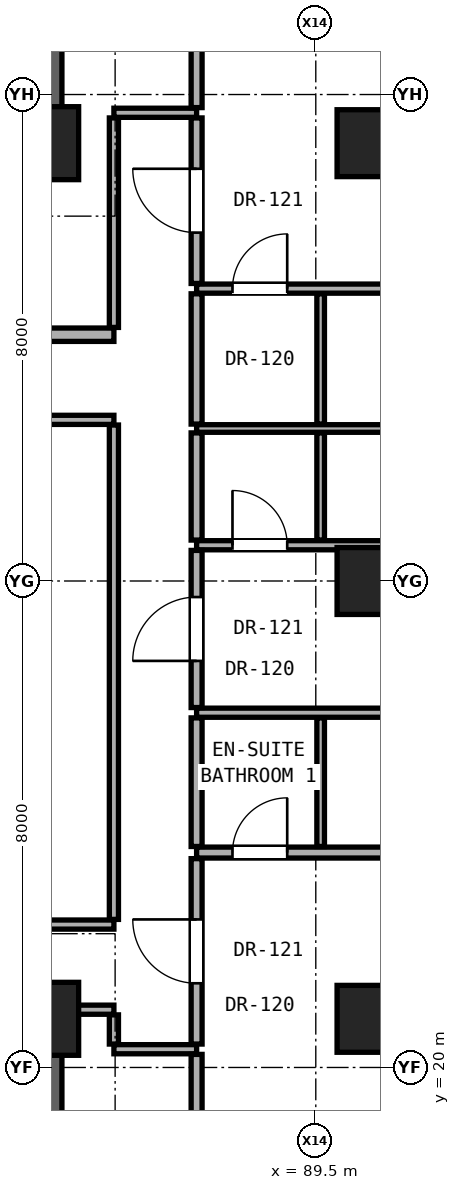
"""IFC4 building model, lengths in metres.
Left out: names, types, materials, properties, quantities, classifications, styles, units other than length and angle.
Written with IfcOpenShell. Run it as: python <this file> out.ifc"""

import sys

from ifc_helpers import new_model, si_unit, direction, frame, frame_2d, origin, origin_2d, place, context, subcontext, project, spatial, rectangle, hollow_rectangle, extrude, element, fill, save


model = new_model("IFC4")
c1 = context("Model", 3, precision=1e-05, world=origin(), true_north=direction((0.0, 1.0)))
c2 = subcontext(c1, "Body", "Model", "MODEL_VIEW")
j1 = project(units=[si_unit("LENGTHUNIT", "METRE"), si_unit("PLANEANGLEUNIT", "RADIAN")], contexts=[c1])
p1 = place(None, origin())
s1 = spatial("IfcSite", under=j1, at=p1, CompositionType="ELEMENT")
p2 = place(p1, origin())
s2 = spatial("IfcBuilding", under=s1, at=p2, CompositionType="ELEMENT")
p3 = place(p2, frame((0.0, 0.0, 111.5)))
s3 = spatial("IfcBuildingStorey", under=s2, at=p3, CompositionType="ELEMENT", Elevation=111.5)
for number, where, z_axis, x_axis in (
    (1, (85.0, 20.8, 0.0), (0.0, 0.0, 1.0), (1.0, 0.0, 0.0)),
    (2, (85.0, 35.2, 0.0), (0.0, 0.0, 1.0), (1.0, 0.0, 0.0)),
):
    element("IfcColumn", number, at=place(p3, frame(where, z_axis=z_axis, x_axis=x_axis)), inside=s3, PredefinedType="COLUMN", context=c2, shape_type="SweptSolid", body=[
        extrude(rectangle(XDim=1.2, YDim=1.2, at=origin_2d()), origin(), (0.0, 0.0, 1.0), 3.3),
    ])
for number, where, z_axis, x_axis in (
    (3, (90.4, 20.8, 0.0), (0.0, 0.0, 1.0), (1.0, 0.0, 0.0)),
    (4, (90.4, 28.0, 0.0), (0.0, 0.0, 1.0), (1.0, 0.0, 0.0)),
    (5, (90.4, 35.2, 0.0), (0.0, 0.0, 1.0), (1.0, 0.0, 0.0)),
):
    element("IfcColumn", number, at=place(p3, frame(where, z_axis=z_axis, x_axis=x_axis)), inside=s3, PredefinedType="COLUMN", context=c2, shape_type="SweptSolid", body=[
        extrude(hollow_rectangle(XDim=1.1, YDim=1.1, WallThickness=0.06, at=origin_2d()), origin(), (0.0, 0.0, 1.0), 3.3),
    ])
for number, where, z_axis, x_axis in (
    (6, (85.0, 35.2, 0.0), (0.0, 0.0, 1.0), (0.0, 1.0, 0.0)),
    (7, (85.0, 15.2, 0.0), (0.0, 0.0, 1.0), (0.0, 1.0, 0.0)),
):
    element("IfcWall", number, at=place(p3, frame(where, z_axis=z_axis, x_axis=x_axis)), inside=s3, PredefinedType="SHEAR", context=c2, shape_type="SweptSolid", body=[
        extrude(rectangle(XDim=5.6, YDim=0.65, at=frame_2d((2.8, 0.0))), origin(), (0.0, 0.0, 1.0), 3.08),
    ])
p4 = place(p3, frame((86.18, 20.3, 0.0), z_axis=(0.0, 0.0, 1.0), x_axis=(1.0, 0.0, 0.0)))
e8 = element("IfcWall", 8, at=p4, inside=s3, PredefinedType="PARTITIONING", context=c2, shape_type="SweptSolid", body=[
    extrude(rectangle(XDim=1.36, YDim=0.15, at=frame_2d((0.68, 0.0))), origin(), (0.0, 0.0, 1.0), 3.08),
])
p5 = place(p3, frame((85.32, 20.95, 0.0), z_axis=(0.0, 0.0, 1.0), x_axis=(1.0, 0.0, 0.0)))
e9 = element("IfcWall", 9, at=p5, inside=s3, PredefinedType="PARTITIONING", context=c2, shape_type="SweptSolid", body=[
    extrude(rectangle(XDim=0.86, YDim=0.15, at=frame_2d((0.43, 0.0))), origin(), (0.0, 0.0, 1.0), 2.472),
])
p6 = place(p3, frame((66.68, 22.35, 0.0), z_axis=(0.0, 0.0, 1.0), x_axis=(1.0, 0.0, 0.0)))
e10 = element("IfcWall", 10, at=p6, inside=s3, PredefinedType="PARTITIONING", context=c2, shape_type="SweptSolid", body=[
    extrude(rectangle(XDim=19.5, YDim=0.15, at=frame_2d((9.75, 0.0))), origin(), (0.0, 0.0, 1.0), 2.145),
])
p7 = place(p6, frame((8.053, 0.0, 0.0)))
e11 = element("IfcOpeningElement", 11, at=p7, cuts=e10, PredefinedType="OPENING", context=c2, shape_type="SweptSolid", body=[
    extrude(rectangle(XDim=0.85, YDim=2.01, at=frame_2d((0.425, 1.005))), frame((0.0, 0.085, 0.0), z_axis=(0.0, -1.0, 0.0), x_axis=(1.0, 0.0, 0.0)), (0.0, 0.0, 1.0), 0.17),
])
p8 = place(p3, frame((87.54, 23.534, 0.0), z_axis=(0.0, 0.0, 1.0), x_axis=(1.0, 0.0, 0.0)))
e12 = element("IfcWall", 12, at=p8, inside=s3, PredefinedType="PARTITIONING", context=c2, shape_type="SweptSolid", body=[
    extrude(rectangle(XDim=7.768, YDim=0.18, at=frame_2d((3.884, 0.0))), origin(), (0.0, 0.0, 1.0), 2.216),
])
p9 = place(p8, frame((4.409, 0.0, 0.0)))
e13 = element("IfcOpeningElement", 13, at=p9, cuts=e12, PredefinedType="OPENING", context=c2, shape_type="SweptSolid", body=[
    extrude(rectangle(XDim=0.95, YDim=2.15, at=frame_2d((0.475, 1.075))), frame((0.0, 0.1, 0.0), z_axis=(0.0, -1.0, 0.0), x_axis=(1.0, 0.0, 0.0)), (0.0, 0.0, 1.0), 0.2),
])
p10 = place(p8, frame((0.59, 0.0, 0.0)))
e14 = element("IfcOpeningElement", 14, at=p10, cuts=e12, PredefinedType="OPENING", context=c2, shape_type="SweptSolid", body=[
    extrude(rectangle(XDim=0.9, YDim=2.1, at=frame_2d((0.45, 1.05))), frame((0.0, 0.1, 0.0), z_axis=(0.0, -1.0, 0.0), x_axis=(1.0, 0.0, 0.0)), (0.0, 0.0, 1.0), 0.2),
])
p11 = place(p3, frame((87.54, 25.834, 0.0), z_axis=(0.0, 0.0, 1.0), x_axis=(1.0, 0.0, 0.0)))
e15 = element("IfcWall", 15, at=p11, inside=s3, PredefinedType="PARTITIONING", context=c2, shape_type="SweptSolid", body=[
    extrude(rectangle(XDim=7.768, YDim=0.15, at=frame_2d((3.884, 0.0))), origin(), (0.0, 0.0, 1.0), 2.216),
])
p12 = place(p3, frame((87.54, 28.588, 0.0), z_axis=(0.0, 0.0, 1.0), x_axis=(1.0, 0.0, 0.0)))
e16 = element("IfcWall", 16, at=p12, inside=s3, PredefinedType="PARTITIONING", context=c2, shape_type="SweptSolid", body=[
    extrude(rectangle(XDim=7.768, YDim=0.15, at=frame_2d((3.884, 0.0))), origin(), (0.0, 0.0, 1.0), 2.216),
])
p13 = place(p12, frame((4.409, 0.0, 0.0)))
e17 = element("IfcOpeningElement", 17, at=p13, cuts=e16, PredefinedType="OPENING", context=c2, shape_type="SweptSolid", body=[
    extrude(rectangle(XDim=0.95, YDim=2.15, at=frame_2d((0.475, 1.075))), frame((0.0, 0.085, 0.0), z_axis=(0.0, -1.0, 0.0), x_axis=(1.0, 0.0, 0.0)), (0.0, 0.0, 1.0), 0.17),
])
p14 = place(p12, frame((0.59, 0.0, 0.0)))
e18 = element("IfcOpeningElement", 18, at=p14, cuts=e16, PredefinedType="OPENING", context=c2, shape_type="SweptSolid", body=[
    extrude(rectangle(XDim=0.9, YDim=2.1, at=frame_2d((0.45, 1.05))), frame((0.0, 0.085, 0.0), z_axis=(0.0, -1.0, 0.0), x_axis=(1.0, 0.0, 0.0)), (0.0, 0.0, 1.0), 0.17),
])
p15 = place(p3, frame((66.68, 30.65, 0.0), z_axis=(0.0, 0.0, 1.0), x_axis=(1.0, 0.0, 0.0)))
e19 = element("IfcWall", 19, at=p15, inside=s3, PredefinedType="PARTITIONING", context=c2, shape_type="SweptSolid", body=[
    extrude(rectangle(XDim=19.5, YDim=0.15, at=frame_2d((9.75, 0.0))), origin(), (0.0, 0.0, 1.0), 2.145),
])
p16 = place(p15, frame((3.795, 0.0, 0.0)))
e20 = element("IfcOpeningElement", 20, at=p16, cuts=e19, PredefinedType="OPENING", context=c2, shape_type="SweptSolid", body=[
    extrude(rectangle(XDim=0.85, YDim=2.01, at=frame_2d((0.425, 1.005))), frame((0.0, 0.085, 0.0), z_axis=(0.0, -1.0, 0.0), x_axis=(1.0, 0.0, 0.0)), (0.0, 0.0, 1.0), 0.17),
])
p17 = place(p15, frame((15.098, 0.0, 0.0)))
e21 = element("IfcOpeningElement", 21, at=p17, cuts=e19, PredefinedType="OPENING", context=c2, shape_type="SweptSolid", body=[
    extrude(rectangle(XDim=0.85, YDim=2.01, at=frame_2d((0.425, 1.005))), frame((0.0, 0.085, 0.0), z_axis=(0.0, -1.0, 0.0), x_axis=(1.0, 0.0, 0.0)), (0.0, 0.0, 1.0), 0.17),
])
p18 = place(p3, frame((87.54, 30.508, 0.0), z_axis=(0.0, 0.0, 1.0), x_axis=(1.0, 0.0, 0.0)))
e22 = element("IfcWall", 22, at=p18, inside=s3, PredefinedType="PARTITIONING", context=c2, shape_type="SweptSolid", body=[
    extrude(rectangle(XDim=7.768, YDim=0.125, at=frame_2d((3.884, 0.0))), origin(), (0.0, 0.0, 1.0), 2.216),
])
p19 = place(p3, frame((71.55, 32.05, 0.0), z_axis=(0.0, 0.0, 1.0), x_axis=(1.0, 0.0, 0.0)))
e23 = element("IfcWall", 23, at=p19, inside=s3, PredefinedType="SOLIDWALL", context=c2, shape_type="SweptSolid", body=[
    extrude(rectangle(XDim=14.63, YDim=0.22, at=frame_2d((7.315, 0.0))), origin(), (0.0, 0.0, 1.0), 2.145),
])
p20 = place(p19, frame((6.065, 0.0, 0.0)))
e24 = element("IfcOpeningElement", 24, at=p20, cuts=e23, PredefinedType="OPENING", context=c2, shape_type="SweptSolid", body=[
    extrude(rectangle(XDim=0.85, YDim=2.01, at=frame_2d((0.425, 1.005))), frame((0.0, 0.12, 0.0), z_axis=(0.0, -1.0, 0.0), x_axis=(1.0, 0.0, 0.0)), (0.0, 0.0, 1.0), 0.24),
])
p21 = place(p19, frame((10.585, 0.0, 0.0)))
e25 = element("IfcOpeningElement", 25, at=p21, cuts=e23, PredefinedType="OPENING", context=c2, shape_type="SweptSolid", body=[
    extrude(rectangle(XDim=0.85, YDim=2.01, at=frame_2d((0.425, 1.005))), frame((0.0, 0.12, 0.0), z_axis=(0.0, -1.0, 0.0), x_axis=(1.0, 0.0, 0.0)), (0.0, 0.0, 1.0), 0.24),
])
p22 = place(p19, frame((0.7, 0.0, 0.0)))
e26 = element("IfcOpeningElement", 26, at=p22, cuts=e23, PredefinedType="OPENING", context=c2, shape_type="SweptSolid", body=[
    extrude(rectangle(XDim=0.85, YDim=2.01, at=frame_2d((0.425, 1.005))), frame((0.0, 0.12, 0.0), z_axis=(0.0, -1.0, 0.0), x_axis=(1.0, 0.0, 0.0)), (0.0, 0.0, 1.0), 0.24),
])
p23 = place(p19, frame((2.55, 0.0, 0.0)))
e27 = element("IfcOpeningElement", 27, at=p23, cuts=e23, PredefinedType="OPENING", context=c2, shape_type="SweptSolid", body=[
    extrude(rectangle(XDim=0.85, YDim=2.01, at=frame_2d((0.425, 1.005))), frame((0.0, 0.12, 0.0), z_axis=(0.0, -1.0, 0.0), x_axis=(1.0, 0.0, 0.0)), (0.0, 0.0, 1.0), 0.24),
])
p24 = place(p3, frame((87.54, 32.808, 0.0), z_axis=(0.0, 0.0, 1.0), x_axis=(1.0, 0.0, 0.0)))
e28 = element("IfcWall", 28, at=p24, inside=s3, PredefinedType="PARTITIONING", context=c2, shape_type="SweptSolid", body=[
    extrude(rectangle(XDim=7.768, YDim=0.15, at=frame_2d((3.884, 0.0))), origin(), (0.0, 0.0, 1.0), 2.216),
])
p25 = place(p24, frame((4.409, 0.0, 0.0)))
e29 = element("IfcOpeningElement", 29, at=p25, cuts=e28, PredefinedType="OPENING", context=c2, shape_type="SweptSolid", body=[
    extrude(rectangle(XDim=0.95, YDim=2.15, at=frame_2d((0.475, 1.075))), frame((0.0, 0.085, 0.0), z_axis=(0.0, -1.0, 0.0), x_axis=(1.0, 0.0, 0.0)), (0.0, 0.0, 1.0), 0.17),
])
p26 = place(p24, frame((0.59, 0.0, 0.0)))
e30 = element("IfcOpeningElement", 30, at=p26, cuts=e28, PredefinedType="OPENING", context=c2, shape_type="SweptSolid", body=[
    extrude(rectangle(XDim=0.9, YDim=2.1, at=frame_2d((0.45, 1.05))), frame((0.0, 0.085, 0.0), z_axis=(0.0, -1.0, 0.0), x_axis=(1.0, 0.0, 0.0)), (0.0, 0.0, 1.0), 0.17),
])
p27 = place(p3, frame((86.18, 35.7, 0.0), z_axis=(0.0, 0.0, 1.0), x_axis=(1.0, 0.0, 0.0)))
e31 = element("IfcWall", 31, at=p27, inside=s3, PredefinedType="PARTITIONING", context=c2, shape_type="SweptSolid", body=[
    extrude(rectangle(XDim=1.36, YDim=0.15, at=frame_2d((0.68, 0.0))), origin(), (0.0, 0.0, 1.0), 3.08),
])
p28 = place(p3, frame((86.18, 20.385, 0.0), z_axis=(0.0, 0.0, 1.0), x_axis=(0.0, 1.0, 0.0)))
e32 = element("IfcWall", 32, at=p28, inside=s3, PredefinedType="PARTITIONING", context=c2, shape_type="SweptSolid", body=[
    extrude(rectangle(XDim=0.48, YDim=0.15, at=frame_2d((0.24, 0.0))), origin(), (0.0, 0.0, 1.0), 2.472),
])
p29 = place(p3, frame((86.18, 22.435, 0.0), z_axis=(0.0, 0.0, 1.0), x_axis=(0.0, 1.0, 0.0)))
e33 = element("IfcWall", 33, at=p29, inside=s3, PredefinedType="PARTITIONING", context=c2, shape_type="SweptSolid", body=[
    extrude(rectangle(XDim=8.13, YDim=0.15, at=frame_2d((4.065, 0.0))), origin(), (0.0, 0.0, 1.0), 2.299),
])
p30 = place(p3, frame((86.18, 32.17, 0.0), z_axis=(0.0, 0.0, 1.0), x_axis=(0.0, 1.0, 0.0)))
e34 = element("IfcWall", 34, at=p30, inside=s3, PredefinedType="PARTITIONING", context=c2, shape_type="SweptSolid", body=[
    extrude(rectangle(XDim=3.445, YDim=0.15, at=frame_2d((1.723, 0.0))), origin(), (0.0, 0.0, 1.0), 2.472),
])
p31 = place(p3, frame((87.54, 16.436, 0.0), z_axis=(0.0, 0.0, 1.0), x_axis=(0.0, 1.0, 0.0)))
e35 = element("IfcWall", 35, at=p31, inside=s3, PredefinedType="PARTITIONING", context=c2, shape_type="SweptSolid", body=[
    extrude(rectangle(XDim=3.779, YDim=0.18, at=frame_2d((1.89, 0.0))), origin(), (0.0, 0.0, 1.0), 2.456),
])
p32 = place(p3, frame((87.54, 20.385, 0.0), z_axis=(0.0, 0.0, 1.0), x_axis=(0.0, 1.0, 0.0)))
e36 = element("IfcWall", 36, at=p32, inside=s3, PredefinedType="PARTITIONING", context=c2, shape_type="SweptSolid", body=[
    extrude(rectangle(XDim=3.049, YDim=0.18, at=frame_2d((1.524, 0.0))), origin(), (0.0, 0.0, 1.0), 2.472),
])
p33 = place(p32, frame((1.0, 0.0, 0.0)))
e37 = element("IfcOpeningElement", 37, at=p33, cuts=e36, PredefinedType="OPENING", context=c2, shape_type="SweptSolid", body=[
    extrude(rectangle(XDim=1.05, YDim=2.2, at=frame_2d((0.525, 1.1))), frame((0.0, 0.1, 0.0), z_axis=(0.0, -1.0, 0.0), x_axis=(1.0, 0.0, 0.0)), (0.0, 0.0, 1.0), 0.2),
])
p34 = place(p3, frame((87.54, 23.634, 0.0), z_axis=(0.0, 0.0, 1.0), x_axis=(0.0, 1.0, 0.0)))
e38 = element("IfcWall", 38, at=p34, inside=s3, PredefinedType="PARTITIONING", context=c2, shape_type="SweptSolid", body=[
    extrude(rectangle(XDim=2.115, YDim=0.18, at=frame_2d((1.058, 0.0))), origin(), (0.0, 0.0, 1.0), 3.08),
])
p35 = place(p3, frame((87.54, 25.919, 0.0), z_axis=(0.0, 0.0, 1.0), x_axis=(0.0, 1.0, 0.0)))
e39 = element("IfcWall", 39, at=p35, inside=s3, PredefinedType="PARTITIONING", context=c2, shape_type="SweptSolid", body=[
    extrude(rectangle(XDim=2.584, YDim=0.18, at=frame_2d((1.292, 0.0))), origin(), (0.0, 0.0, 1.0), 2.299),
])
p36 = place(p35, frame((0.767, 0.0, 0.0)))
e40 = element("IfcOpeningElement", 40, at=p36, cuts=e39, PredefinedType="OPENING", context=c2, shape_type="SweptSolid", body=[
    extrude(rectangle(XDim=1.05, YDim=2.2, at=frame_2d((0.525, 1.1))), frame((0.0, 0.1, 0.0), z_axis=(0.0, -1.0, 0.0), x_axis=(1.0, 0.0, 0.0)), (0.0, 0.0, 1.0), 0.2),
])
p37 = place(p3, frame((87.54, 28.673, 0.0), z_axis=(0.0, 0.0, 1.0), x_axis=(0.0, 1.0, 0.0)))
e41 = element("IfcWall", 41, at=p37, inside=s3, PredefinedType="PARTITIONING", context=c2, shape_type="SweptSolid", body=[
    extrude(rectangle(XDim=1.762, YDim=0.18, at=frame_2d((0.881, 0.0))), origin(), (0.0, 0.0, 1.0), 3.08),
])
p38 = place(p3, frame((87.54, 30.581, 0.0), z_axis=(0.0, 0.0, 1.0), x_axis=(0.0, 1.0, 0.0)))
e42 = element("IfcWall", 42, at=p38, inside=s3, PredefinedType="PARTITIONING", context=c2, shape_type="SweptSolid", body=[
    extrude(rectangle(XDim=2.142, YDim=0.18, at=frame_2d((1.071, 0.0))), origin(), (0.0, 0.0, 1.0), 3.08),
])
p39 = place(p3, frame((87.54, 32.893, 0.0), z_axis=(0.0, 0.0, 1.0), x_axis=(0.0, 1.0, 0.0)))
e43 = element("IfcWall", 43, at=p39, inside=s3, PredefinedType="PARTITIONING", context=c2, shape_type="SweptSolid", body=[
    extrude(rectangle(XDim=2.722, YDim=0.18, at=frame_2d((1.361, 0.0))), origin(), (0.0, 0.0, 1.0), 2.472),
])
p40 = place(p39, frame((0.836, 0.0, 0.0)))
e44 = element("IfcOpeningElement", 44, at=p40, cuts=e43, PredefinedType="OPENING", context=c2, shape_type="SweptSolid", body=[
    extrude(rectangle(XDim=1.05, YDim=2.2, at=frame_2d((0.525, 1.1))), frame((0.0, 0.1, 0.0), z_axis=(0.0, -1.0, 0.0), x_axis=(1.0, 0.0, 0.0)), (0.0, 0.0, 1.0), 0.2),
])
p41 = place(p3, frame((87.54, 35.785, 0.0), z_axis=(0.0, 0.0, 1.0), x_axis=(0.0, 1.0, 0.0)))
e45 = element("IfcWall", 45, at=p41, inside=s3, PredefinedType="PARTITIONING", context=c2, shape_type="SweptSolid", body=[
    extrude(rectangle(XDim=3.794, YDim=0.18, at=frame_2d((1.897, 0.0))), origin(), (0.0, 0.0, 1.0), 2.456),
])
p42 = place(p3, frame((89.58, 23.634, 0.0), z_axis=(0.0, 0.0, 1.0), x_axis=(0.0, 1.0, 0.0)))
e46 = element("IfcWall", 46, at=p42, inside=s3, PredefinedType="PARTITIONING", context=c2, shape_type="SweptSolid", body=[
    extrude(rectangle(XDim=2.115, YDim=0.125, at=frame_2d((1.058, 0.0))), origin(), (0.0, 0.0, 1.0), 3.08),
])
p43 = place(p3, frame((89.58, 28.673, 0.0), z_axis=(0.0, 0.0, 1.0), x_axis=(0.0, 1.0, 0.0)))
e47 = element("IfcWall", 47, at=p43, inside=s3, PredefinedType="PARTITIONING", context=c2, shape_type="SweptSolid", body=[
    extrude(rectangle(XDim=1.762, YDim=0.125, at=frame_2d((0.881, 0.0))), origin(), (0.0, 0.0, 1.0), 3.08),
])
p44 = place(p3, frame((89.58, 30.581, 0.0), z_axis=(0.0, 0.0, 1.0), x_axis=(0.0, 1.0, 0.0)))
e48 = element("IfcWall", 48, at=p44, inside=s3, PredefinedType="PARTITIONING", context=c2, shape_type="SweptSolid", body=[
    extrude(rectangle(XDim=2.142, YDim=0.125, at=frame_2d((1.071, 0.0))), origin(), (0.0, 0.0, 1.0), 3.08),
])
p45 = place(p33, origin())
e49 = element("IfcDoor", 49, at=p45, inside=s3, OperationType="SINGLE_SWING_RIGHT", PredefinedType="DOOR", context=c2, shape_type="SweptSolid", body=[
    extrude(rectangle(XDim=1.05, YDim=2.2, at=frame_2d((0.525, 1.1))), frame((0.0, 0.025, 0.0), z_axis=(0.0, -1.0, 0.0), x_axis=(1.0, 0.0, 0.0)), (0.0, 0.0, 1.0), 0.05),
])
fill(e37, e49)
p46 = place(p10, origin())
e50 = element("IfcDoor", 50, at=p46, inside=s3, OperationType="SINGLE_SWING_RIGHT", PredefinedType="DOOR", context=c2, shape_type="SweptSolid", body=[
    extrude(rectangle(XDim=0.9, YDim=2.1, at=frame_2d((0.45, 1.05))), frame((0.0, 0.025, 0.0), z_axis=(0.0, -1.0, 0.0), x_axis=(1.0, 0.0, 0.0)), (0.0, 0.0, 1.0), 0.05),
])
fill(e14, e50)
p47 = place(p36, origin())
e51 = element("IfcDoor", 51, at=p47, inside=s3, OperationType="SINGLE_SWING_LEFT", PredefinedType="DOOR", context=c2, shape_type="SweptSolid", body=[
    extrude(rectangle(XDim=1.05, YDim=2.2, at=frame_2d((0.525, 1.1))), frame((0.0, 0.025, 0.0), z_axis=(0.0, -1.0, 0.0), x_axis=(1.0, 0.0, 0.0)), (0.0, 0.0, 1.0), 0.05),
])
fill(e40, e51)
p48 = place(p14, origin())
e52 = element("IfcDoor", 52, at=p48, inside=s3, OperationType="SINGLE_SWING_LEFT", PredefinedType="DOOR", context=c2, shape_type="SweptSolid", body=[
    extrude(rectangle(XDim=0.9, YDim=2.1, at=frame_2d((0.45, 1.05))), frame((0.0, 0.025, 0.0), z_axis=(0.0, -1.0, 0.0), x_axis=(1.0, 0.0, 0.0)), (0.0, 0.0, 1.0), 0.05),
])
fill(e18, e52)
p49 = place(p40, origin())
e53 = element("IfcDoor", 53, at=p49, inside=s3, OperationType="SINGLE_SWING_RIGHT", PredefinedType="DOOR", context=c2, shape_type="SweptSolid", body=[
    extrude(rectangle(XDim=1.05, YDim=2.2, at=frame_2d((0.525, 1.1))), frame((0.0, 0.025, 0.0), z_axis=(0.0, -1.0, 0.0), x_axis=(1.0, 0.0, 0.0)), (0.0, 0.0, 1.0), 0.05),
])
fill(e44, e53)
p50 = place(p26, origin())
e54 = element("IfcDoor", 54, at=p50, inside=s3, OperationType="SINGLE_SWING_RIGHT", PredefinedType="DOOR", context=c2, shape_type="SweptSolid", body=[
    extrude(rectangle(XDim=0.9, YDim=2.1, at=frame_2d((0.45, 1.05))), frame((0.0, 0.025, 0.0), z_axis=(0.0, -1.0, 0.0), x_axis=(1.0, 0.0, 0.0)), (0.0, 0.0, 1.0), 0.05),
])
fill(e30, e54)
save(model, sys.argv[1])
